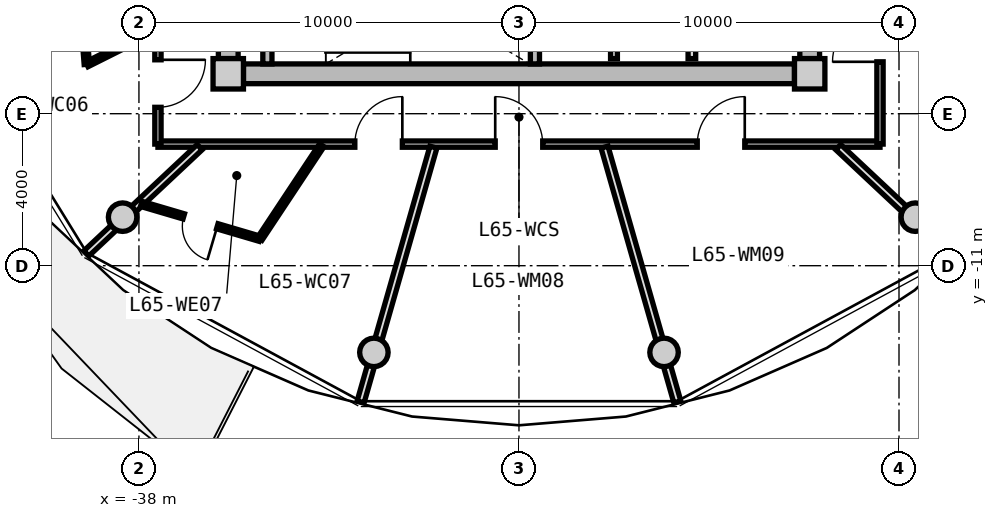
"""IFC4 building model, lengths in metres.
Left out: names, types, materials, properties, quantities, classifications, styles, units other than length and angle.
Written with IfcOpenShell. Run it as: python <this file> out.ifc"""

import sys

from ifc_helpers import new_model, si_unit, direction, frame, frame_2d, origin, origin_2d, place, context, subcontext, project, spatial, rectangle, circle, extrude, source, transform, mapped, element, fill, save


model = new_model("IFC4")
c1 = context("Model", 3, precision=1e-05, world=origin(), true_north=direction((0.0, 1.0)))
c2 = subcontext(c1, "Body", "Model", "MODEL_VIEW")
j1 = project(units=[si_unit("LENGTHUNIT", "METRE"), si_unit("PLANEANGLEUNIT", "RADIAN")], contexts=[c1])
p1 = place(None, origin())
s1 = spatial("IfcSite", under=j1, at=p1, CompositionType="ELEMENT")
p2 = place(p1, origin())
s2 = spatial("IfcBuilding", under=s1, at=p2, CompositionType="ELEMENT")
p3 = place(p2, frame((0.0, 0.0, 210.85)))
s3 = spatial("IfcBuildingStorey", under=s2, at=p3, CompositionType="ELEMENT", Elevation=210.85)
m1 = source(origin(), c2, "Body", "SweptSolid", [
    extrude(rectangle(XDim=0.8, YDim=0.8, at=origin_2d()), origin(), (0.0, 0.0, 1.0), 3.05),
])
for number, where, z_axis, x_axis in (
    (1, (-35.65, -5.95, 0.0), (0.0, 0.0, 1.0), (1.0, 0.0, 0.0)),
    (2, (-20.35, -5.95, 0.0), (0.0, 0.0, 1.0), (1.0, 0.0, 0.0)),
):
    element("IfcColumn", number, at=place(p3, frame(where, z_axis=z_axis, x_axis=x_axis)), inside=s3, PredefinedType="COLUMN", context=c2, shape_type="MappedRepresentation", body=[
        mapped(m1, transform((0.0, 0.0, 0.0), x_axis=(1.0, 0.0, 0.0), y_axis=(0.0, 1.0, 0.0), z_axis=(0.0, 0.0, 1.0), scale=1.0)),
    ])
m2 = source(origin(), c2, "Body", "SweptSolid", [
    extrude(rectangle(XDim=14.5, YDim=0.52, at=frame_2d((7.25, 0.0))), origin(), (0.0, 0.0, 1.0), 2.76),
])
p4 = place(p3, frame((-20.75, -5.95, 0.0), z_axis=(0.0, 0.0, 1.0), x_axis=(-1.0, 0.0, 0.0)))
e3 = element("IfcWall", 3, at=p4, inside=s3, PredefinedType="SHEAR", context=c2, shape_type="MappedRepresentation", body=[
    mapped(m2, transform((0.0, 0.0, 0.0), x_axis=(1.0, 0.0, 0.0), y_axis=(0.0, 1.0, 0.0), z_axis=(0.0, 0.0, 1.0), scale=1.0)),
])
m3 = source(origin(), c2, "Body", "SweptSolid", [
    extrude(rectangle(XDim=11.1, YDim=0.52, at=frame_2d((5.55, 0.0))), origin(), (0.0, 0.0, 1.0), 2.76),
])
p5 = place(p3, frame((-35.65, -5.55, 0.0), z_axis=(0.0, 0.0, 1.0), x_axis=(0.0, 1.0, 0.0)))
e4 = element("IfcWall", 4, at=p5, inside=s3, PredefinedType="SHEAR", context=c2, shape_type="MappedRepresentation", body=[
    mapped(m3, transform((0.0, 0.0, 0.0), x_axis=(1.0, 0.0, 0.0), y_axis=(0.0, 1.0, 0.0), z_axis=(0.0, 0.0, 1.0), scale=1.0)),
])
p6 = place(p5, frame((3.8, 0.0, 0.0)))
e5 = element("IfcOpeningElement", 5, at=p6, cuts=e4, PredefinedType="OPENING", context=c2, shape_type="SweptSolid", body=[
    extrude(rectangle(XDim=1.2, YDim=2.15, at=frame_2d((0.6, 1.075))), frame((0.0, 0.27, 0.0), z_axis=(0.0, -1.0, 0.0), x_axis=(1.0, 0.0, 0.0)), (0.0, 0.0, 1.0), 0.54),
])
p7 = place(p3, frame((-20.35, 5.55, 0.0), z_axis=(0.0, 0.0, 1.0), x_axis=(0.0, -1.0, 0.0)))
e6 = element("IfcWall", 6, at=p7, inside=s3, PredefinedType="SHEAR", context=c2, shape_type="MappedRepresentation", body=[
    mapped(m3, transform((0.0, 0.0, 0.0), x_axis=(1.0, 0.0, 0.0), y_axis=(0.0, 1.0, 0.0), z_axis=(0.0, 0.0, 1.0), scale=1.0)),
])
p8 = place(p7, frame((5.65, 0.0, 0.0)))
e7 = element("IfcOpeningElement", 7, at=p8, cuts=e6, PredefinedType="OPENING", context=c2, shape_type="SweptSolid", body=[
    extrude(rectangle(XDim=1.2, YDim=2.15, at=frame_2d((0.6, 1.075))), frame((0.0, 0.27, 0.0), z_axis=(0.0, -1.0, 0.0), x_axis=(1.0, 0.0, 0.0)), (0.0, 0.0, 1.0), 0.54),
])
p9 = place(p7, frame((9.3, 0.0, 0.0)))
e8 = element("IfcOpeningElement", 8, at=p9, cuts=e6, PredefinedType="OPENING", context=c2, shape_type="SweptSolid", body=[
    extrude(rectangle(XDim=1.0, YDim=2.1, at=frame_2d((0.5, 1.05))), frame((0.0, 0.27, 0.0), z_axis=(0.0, -1.0, 0.0), x_axis=(1.0, 0.0, 0.0)), (0.0, 0.0, 1.0), 0.54),
])
m4 = source(origin(), c2, "Body", "SweptSolid", [
    extrude(circle(Radius=0.375, at=origin_2d()), origin(), (0.0, 0.0, 1.0), 3.05),
])
for number, where, z_axis, x_axis in (
    (9, (-38.43, -9.723, 0.0), (0.0, 0.0, 1.0), (1.0, 0.0, 0.0)),
    (10, (-31.818, -13.281, 0.0), (0.0, 0.0, 1.0), (1.0, 0.0, 0.0)),
    (11, (-24.182, -13.281, 0.0), (0.0, 0.0, 1.0), (1.0, 0.0, 0.0)),
    (12, (-17.57, -9.723, 0.0), (0.0, 0.0, 1.0), (1.0, 0.0, 0.0)),
):
    element("IfcColumn", number, at=place(p3, frame(where, z_axis=z_axis, x_axis=x_axis)), inside=s3, PredefinedType="COLUMN", context=c2, shape_type="MappedRepresentation", body=[
        mapped(m4, transform((0.0, 0.0, 0.0), x_axis=(1.0, 0.0, 0.0), y_axis=(0.0, 1.0, 0.0), z_axis=(0.0, 0.0, 1.0), scale=1.0)),
    ])
m5 = source(origin(), c2, "Body", "SweptSolid", [
    extrude(rectangle(XDim=3.24, YDim=0.24, at=frame_2d((1.62, 0.0))), origin(), (0.0, 0.0, 1.0), 2.76),
])
for number, where, z_axis, x_axis in (
    (13, (-34.62, -5.69, 0.0), (0.0, 0.0, 1.0), (0.0, 1.0, 0.0)),
    (14, (-27.58, -5.69, 0.0), (0.0, 0.0, 1.0), (0.0, 1.0, 0.0)),
):
    element("IfcWall", number, at=place(p3, frame(where, z_axis=z_axis, x_axis=x_axis)), inside=s3, PredefinedType="PARTITIONING", context=c2, shape_type="MappedRepresentation", body=[
        mapped(m5, transform((0.0, 0.0, 0.0), x_axis=(1.0, 0.0, 0.0), y_axis=(0.0, 1.0, 0.0), z_axis=(0.0, 0.0, 1.0), scale=1.0)),
    ])
m6 = source(origin(), c2, "Body", "SweptSolid", [
    extrude(rectangle(XDim=3.8, YDim=0.2, at=frame_2d((1.9, 0.0))), origin(), (0.0, 0.0, 1.0), 2.745),
])
p10 = place(p3, frame((-23.45, -5.55, 0.0), z_axis=(0.0, 0.0, 1.0), x_axis=(0.0, 1.0, 0.0)))
e15 = element("IfcWall", 15, at=p10, inside=s3, PredefinedType="PARTITIONING", context=c2, shape_type="MappedRepresentation", body=[
    mapped(m6, transform((0.0, 0.0, 0.0), x_axis=(1.0, 0.0, 0.0), y_axis=(0.0, 1.0, 0.0), z_axis=(0.0, 0.0, 1.0), scale=1.0)),
])
m7 = source(origin(), c2, "Body", "SweptSolid", [
    extrude(rectangle(XDim=4.2, YDim=0.18, at=frame_2d((2.1, 0.0))), origin(), (0.0, 0.0, 1.0), 2.745),
])
p11 = place(p3, frame((-25.5, -5.55, 0.0), z_axis=(0.0, 0.0, 1.0), x_axis=(0.0, 1.0, 0.0)))
e16 = element("IfcWall", 16, at=p11, inside=s3, PredefinedType="PARTITIONING", context=c2, shape_type="MappedRepresentation", body=[
    mapped(m7, transform((0.0, 0.0, 0.0), x_axis=(1.0, 0.0, 0.0), y_axis=(0.0, 1.0, 0.0), z_axis=(0.0, 0.0, 1.0), scale=1.0)),
])
m8 = source(origin(), c2, "Body", "SweptSolid", [
    extrude(rectangle(XDim=19.0, YDim=0.165, at=frame_2d((9.5, 0.0))), origin(), (0.0, 0.0, 1.0), 2.745),
])
p12 = place(p3, frame((-18.5, -7.8, 0.0), z_axis=(0.0, 0.0, 1.0), x_axis=(-1.0, 0.0, 0.0)))
e17 = element("IfcWall", 17, at=p12, inside=s3, PredefinedType="PARTITIONING", context=c2, shape_type="MappedRepresentation", body=[
    mapped(m8, transform((0.0, 0.0, 0.0), x_axis=(1.0, 0.0, 0.0), y_axis=(0.0, 1.0, 0.0), z_axis=(0.0, 0.0, 1.0), scale=1.0)),
])
p13 = place(p12, frame((12.569, 0.0, 0.0)))
e18 = element("IfcOpeningElement", 18, at=p13, cuts=e17, PredefinedType="OPENING", context=c2, shape_type="SweptSolid", body=[
    extrude(rectangle(XDim=1.25, YDim=2.2, at=frame_2d((0.625, 1.1))), frame((0.0, 0.093, 0.0), z_axis=(0.0, -1.0, 0.0), x_axis=(1.0, 0.0, 0.0)), (0.0, 0.0, 1.0), 0.185),
])
p14 = place(p12, frame((8.875, 0.0, 0.0)))
e19 = element("IfcOpeningElement", 19, at=p14, cuts=e17, PredefinedType="OPENING", context=c2, shape_type="SweptSolid", body=[
    extrude(rectangle(XDim=1.25, YDim=2.2, at=frame_2d((0.625, 1.1))), frame((0.0, 0.093, 0.0), z_axis=(0.0, -1.0, 0.0), x_axis=(1.0, 0.0, 0.0)), (0.0, 0.0, 1.0), 0.185),
])
p15 = place(p12, frame((3.559, 0.0, 0.0)))
e20 = element("IfcOpeningElement", 20, at=p15, cuts=e17, PredefinedType="OPENING", context=c2, shape_type="SweptSolid", body=[
    extrude(rectangle(XDim=1.25, YDim=2.2, at=frame_2d((0.625, 1.1))), frame((0.0, 0.093, 0.0), z_axis=(0.0, -1.0, 0.0), x_axis=(1.0, 0.0, 0.0)), (0.0, 0.0, 1.0), 0.185),
])
m9 = source(origin(), c2, "Body", "SweptSolid", [
    extrude(rectangle(XDim=6.88, YDim=0.165, at=frame_2d((3.44, 0.0))), origin(), (0.0, 0.0, 1.0), 2.745),
])
p16 = place(p3, frame((-37.5, -7.8, 0.0), z_axis=(0.0, 0.0, 1.0), x_axis=(0.0, 1.0, 0.0)))
e21 = element("IfcWall", 21, at=p16, inside=s3, PredefinedType="PARTITIONING", context=c2, shape_type="MappedRepresentation", body=[
    mapped(m9, transform((0.0, 0.0, 0.0), x_axis=(1.0, 0.0, 0.0), y_axis=(0.0, 1.0, 0.0), z_axis=(0.0, 0.0, 1.0), scale=1.0)),
])
p17 = place(p16, frame((0.968, 0.0, 0.0)))
e22 = element("IfcOpeningElement", 22, at=p17, cuts=e21, PredefinedType="OPENING", context=c2, shape_type="SweptSolid", body=[
    extrude(rectangle(XDim=1.25, YDim=2.2, at=frame_2d((0.625, 1.1))), frame((0.0, 0.093, 0.0), z_axis=(0.0, -1.0, 0.0), x_axis=(1.0, 0.0, 0.0)), (0.0, 0.0, 1.0), 0.185),
])
p18 = place(p3, frame((-18.5, -0.92, 0.0), z_axis=(0.0, 0.0, 1.0), x_axis=(0.0, -1.0, 0.0)))
e23 = element("IfcWall", 23, at=p18, inside=s3, PredefinedType="PARTITIONING", context=c2, shape_type="MappedRepresentation", body=[
    mapped(m9, transform((0.0, 0.0, 0.0), x_axis=(1.0, 0.0, 0.0), y_axis=(0.0, 1.0, 0.0), z_axis=(0.0, 0.0, 1.0), scale=1.0)),
])
p19 = place(p18, frame((3.464, 0.0, 0.0)))
e24 = element("IfcOpeningElement", 24, at=p19, cuts=e23, PredefinedType="OPENING", context=c2, shape_type="SweptSolid", body=[
    extrude(rectangle(XDim=1.25, YDim=2.2, at=frame_2d((0.625, 1.1))), frame((0.0, 0.093, 0.0), z_axis=(0.0, -1.0, 0.0), x_axis=(1.0, 0.0, 0.0)), (0.0, 0.0, 1.0), 0.185),
])
m10 = source(origin(), c2, "Body", "SweptSolid", [
    extrude(rectangle(XDim=4.089, YDim=0.19, at=frame_2d((2.044, 0.0))), origin(), (0.0, 0.0, 1.0), 2.345),
])
p20 = place(p3, frame((-36.402, -7.88, 0.0), z_axis=(0.0, 0.0, 1.0), x_axis=(-0.729401273609, -0.684086092577, 0.0)))
e25 = element("IfcWall", 25, at=p20, inside=s3, PredefinedType="PARTITIONING", context=c2, shape_type="MappedRepresentation", body=[
    mapped(m10, transform((0.0, 0.0, 0.0), x_axis=(1.0, 0.0, 0.0), y_axis=(0.0, 1.0, 0.0), z_axis=(0.0, 0.0, 1.0), scale=1.0)),
])
m11 = source(origin(), c2, "Body", "SweptSolid", [
    extrude(rectangle(XDim=2.06, YDim=0.14, at=frame_2d((1.03, 0.0))), origin(), (0.0, 0.0, 1.0), 2.745),
])
p21 = place(p3, frame((-37.53, -4.778, 0.0), z_axis=(0.0, 0.0, 1.0), x_axis=(-0.893952568722, -0.448161583444, 0.0)))
e26 = element("IfcWall", 26, at=p21, inside=s3, PredefinedType="PARTITIONING", context=c2, shape_type="MappedRepresentation", body=[
    mapped(m11, transform((0.0, 0.0, 0.0), x_axis=(1.0, 0.0, 0.0), y_axis=(0.0, 1.0, 0.0), z_axis=(0.0, 0.0, 1.0), scale=1.0)),
])
m12 = source(origin(), c2, "Body", "SweptSolid", [
    extrude(rectangle(XDim=2.798, YDim=0.14, at=frame_2d((1.399, 0.0))), origin(), (0.0, 0.0, 1.0), 2.745),
])
p22 = place(p3, frame((-39.371, -5.701, 0.0), z_axis=(0.0, 0.0, 1.0), x_axis=(-0.077823984089, 0.996967114553, 0.0)))
e27 = element("IfcWall", 27, at=p22, inside=s3, PredefinedType="PARTITIONING", context=c2, shape_type="MappedRepresentation", body=[
    mapped(m12, transform((0.0, 0.0, 0.0), x_axis=(1.0, 0.0, 0.0), y_axis=(0.0, 1.0, 0.0), z_axis=(0.0, 0.0, 1.0), scale=1.0)),
])
p23 = place(p22, frame((0.939, 0.0, 0.0)))
e28 = element("IfcOpeningElement", 28, at=p23, cuts=e27, PredefinedType="OPENING", context=c2, shape_type="SweptSolid", body=[
    extrude(rectangle(XDim=0.92, YDim=2.1, at=frame_2d((0.46, 1.05))), frame((0.0, 0.08, 0.0), z_axis=(0.0, -1.0, 0.0), x_axis=(1.0, 0.0, 0.0)), (0.0, 0.0, 1.0), 0.16),
])
m13 = source(origin(), c2, "Body", "SweptSolid", [
    extrude(rectangle(XDim=6.974, YDim=0.19, at=frame_2d((3.487, 0.0))), origin(), (0.0, 0.0, 1.0), 2.345),
])
p24 = place(p3, frame((-30.251, -7.88, 0.0), z_axis=(0.0, 0.0, 1.0), x_axis=(-0.274707256801, -0.961527910703, 0.0)))
e29 = element("IfcWall", 29, at=p24, inside=s3, PredefinedType="PARTITIONING", context=c2, shape_type="MappedRepresentation", body=[
    mapped(m13, transform((0.0, 0.0, 0.0), x_axis=(1.0, 0.0, 0.0), y_axis=(0.0, 1.0, 0.0), z_axis=(0.0, 0.0, 1.0), scale=1.0)),
])
m14 = source(origin(), c2, "Body", "SweptSolid", [
    extrude(rectangle(XDim=2.953, YDim=0.14, at=frame_2d((1.476, 0.0))), origin(), (0.0, 0.0, 1.0), 2.745),
])
p25 = place(p3, frame((-33.188, -7.83, 0.0), z_axis=(0.0, 0.0, 1.0), x_axis=(-0.552427436518, -0.833560991999, 0.0)))
e30 = element("IfcWall", 30, at=p25, inside=s3, PredefinedType="PARTITIONING", context=c2, shape_type="MappedRepresentation", body=[
    mapped(m14, transform((0.0, 0.0, 0.0), x_axis=(1.0, 0.0, 0.0), y_axis=(0.0, 1.0, 0.0), z_axis=(0.0, 0.0, 1.0), scale=1.0)),
])
m15 = source(origin(), c2, "Body", "SweptSolid", [
    extrude(rectangle(XDim=3.252, YDim=0.14, at=frame_2d((1.626, 0.0))), origin(), (0.0, 0.0, 1.0), 2.745),
])
p26 = place(p3, frame((-34.82, -10.291, 0.0), z_axis=(0.0, 0.0, 1.0), x_axis=(-0.959294945864, 0.282406102695, 0.0)))
e31 = element("IfcWall", 31, at=p26, inside=s3, PredefinedType="PARTITIONING", context=c2, shape_type="MappedRepresentation", body=[
    mapped(m15, transform((0.0, 0.0, 0.0), x_axis=(1.0, 0.0, 0.0), y_axis=(0.0, 1.0, 0.0), z_axis=(0.0, 0.0, 1.0), scale=1.0)),
])
p27 = place(p26, frame((1.166, 0.0, 0.0)))
e32 = element("IfcOpeningElement", 32, at=p27, cuts=e31, PredefinedType="OPENING", context=c2, shape_type="SweptSolid", body=[
    extrude(rectangle(XDim=0.92, YDim=2.1, at=frame_2d((0.46, 1.05))), frame((0.0, 0.08, 0.0), z_axis=(0.0, -1.0, 0.0), x_axis=(1.0, 0.0, 0.0)), (0.0, 0.0, 1.0), 0.16),
])
p28 = place(p3, frame((-25.749, -7.88, 0.0), z_axis=(0.0, 0.0, 1.0), x_axis=(0.274707256801, -0.961527910703, 0.0)))
e33 = element("IfcWall", 33, at=p28, inside=s3, PredefinedType="PARTITIONING", context=c2, shape_type="MappedRepresentation", body=[
    mapped(m13, transform((0.0, 0.0, 0.0), x_axis=(1.0, 0.0, 0.0), y_axis=(0.0, 1.0, 0.0), z_axis=(0.0, 0.0, 1.0), scale=1.0)),
])
p29 = place(p3, frame((-19.598, -7.88, 0.0), z_axis=(0.0, 0.0, 1.0), x_axis=(0.729401273609, -0.684086092577, 0.0)))
e34 = element("IfcWall", 34, at=p29, inside=s3, PredefinedType="PARTITIONING", context=c2, shape_type="MappedRepresentation", body=[
    mapped(m10, transform((0.0, 0.0, 0.0), x_axis=(1.0, 0.0, 0.0), y_axis=(0.0, 1.0, 0.0), z_axis=(0.0, 0.0, 1.0), scale=1.0)),
])
m16 = source(origin(), c2, "Body", "SweptSolid", [
    extrude(rectangle(XDim=1.25, YDim=2.2, at=frame_2d((0.625, 1.1))), frame((0.0, 0.025, 0.0), z_axis=(0.0, -1.0, 0.0), x_axis=(1.0, 0.0, 0.0)), (0.0, 0.0, 1.0), 0.05),
])
p30 = place(p17, frame((1.25, 0.0, 0.0), z_axis=(0.0, 0.0, 1.0), x_axis=(-1.0, 0.0, 0.0)))
e35 = element("IfcDoor", 35, at=p30, inside=s3, OperationType="SINGLE_SWING_LEFT", PredefinedType="DOOR", context=c2, shape_type="MappedRepresentation", body=[
    mapped(m16, transform((0.0, 0.0, 0.0), x_axis=(1.0, 0.0, 0.0), y_axis=(0.0, 1.0, 0.0), z_axis=(0.0, 0.0, 1.0), scale=1.0)),
])
fill(e22, e35)
p31 = place(p13, frame((1.25, 0.0, 0.0), z_axis=(0.0, 0.0, 1.0), x_axis=(-1.0, 0.0, 0.0)))
e36 = element("IfcDoor", 36, at=p31, inside=s3, OperationType="SINGLE_SWING_RIGHT", PredefinedType="DOOR", context=c2, shape_type="MappedRepresentation", body=[
    mapped(m16, transform((0.0, 0.0, 0.0), x_axis=(1.0, 0.0, 0.0), y_axis=(0.0, 1.0, 0.0), z_axis=(0.0, 0.0, 1.0), scale=1.0)),
])
fill(e18, e36)
m17 = source(origin(), c2, "Body", "SweptSolid", [
    extrude(rectangle(XDim=0.92, YDim=2.1, at=frame_2d((0.46, 1.05))), frame((0.0, 0.025, 0.0), z_axis=(0.0, -1.0, 0.0), x_axis=(1.0, 0.0, 0.0)), (0.0, 0.0, 1.0), 0.05),
])
p32 = place(p27, origin())
e37 = element("IfcDoor", 37, at=p32, inside=s3, OperationType="SINGLE_SWING_LEFT", PredefinedType="DOOR", context=c2, shape_type="MappedRepresentation", body=[
    mapped(m17, transform((0.0, 0.0, 0.0), x_axis=(1.0, 0.0, 0.0), y_axis=(0.0, 1.0, 0.0), z_axis=(0.0, 0.0, 1.0), scale=1.0)),
])
fill(e32, e37)
p33 = place(p14, frame((1.25, 0.0, 0.0), z_axis=(0.0, 0.0, 1.0), x_axis=(-1.0, 0.0, 0.0)))
e38 = element("IfcDoor", 38, at=p33, inside=s3, OperationType="SINGLE_SWING_LEFT", PredefinedType="DOOR", context=c2, shape_type="MappedRepresentation", body=[
    mapped(m16, transform((0.0, 0.0, 0.0), x_axis=(1.0, 0.0, 0.0), y_axis=(0.0, 1.0, 0.0), z_axis=(0.0, 0.0, 1.0), scale=1.0)),
])
fill(e19, e38)
p34 = place(p15, frame((1.25, 0.0, 0.0), z_axis=(0.0, 0.0, 1.0), x_axis=(-1.0, 0.0, 0.0)))
e39 = element("IfcDoor", 39, at=p34, inside=s3, OperationType="SINGLE_SWING_RIGHT", PredefinedType="DOOR", context=c2, shape_type="MappedRepresentation", body=[
    mapped(m16, transform((0.0, 0.0, 0.0), x_axis=(1.0, 0.0, 0.0), y_axis=(0.0, 1.0, 0.0), z_axis=(0.0, 0.0, 1.0), scale=1.0)),
])
fill(e20, e39)
p35 = place(p19, frame((1.25, 0.0, 0.0), z_axis=(0.0, 0.0, 1.0), x_axis=(-1.0, 0.0, 0.0)))
e40 = element("IfcDoor", 40, at=p35, inside=s3, OperationType="SINGLE_SWING_LEFT", PredefinedType="DOOR", context=c2, shape_type="MappedRepresentation", body=[
    mapped(m16, transform((0.0, 0.0, 0.0), x_axis=(1.0, 0.0, 0.0), y_axis=(0.0, 1.0, 0.0), z_axis=(0.0, 0.0, 1.0), scale=1.0)),
])
fill(e24, e40)
save(model, sys.argv[1])
